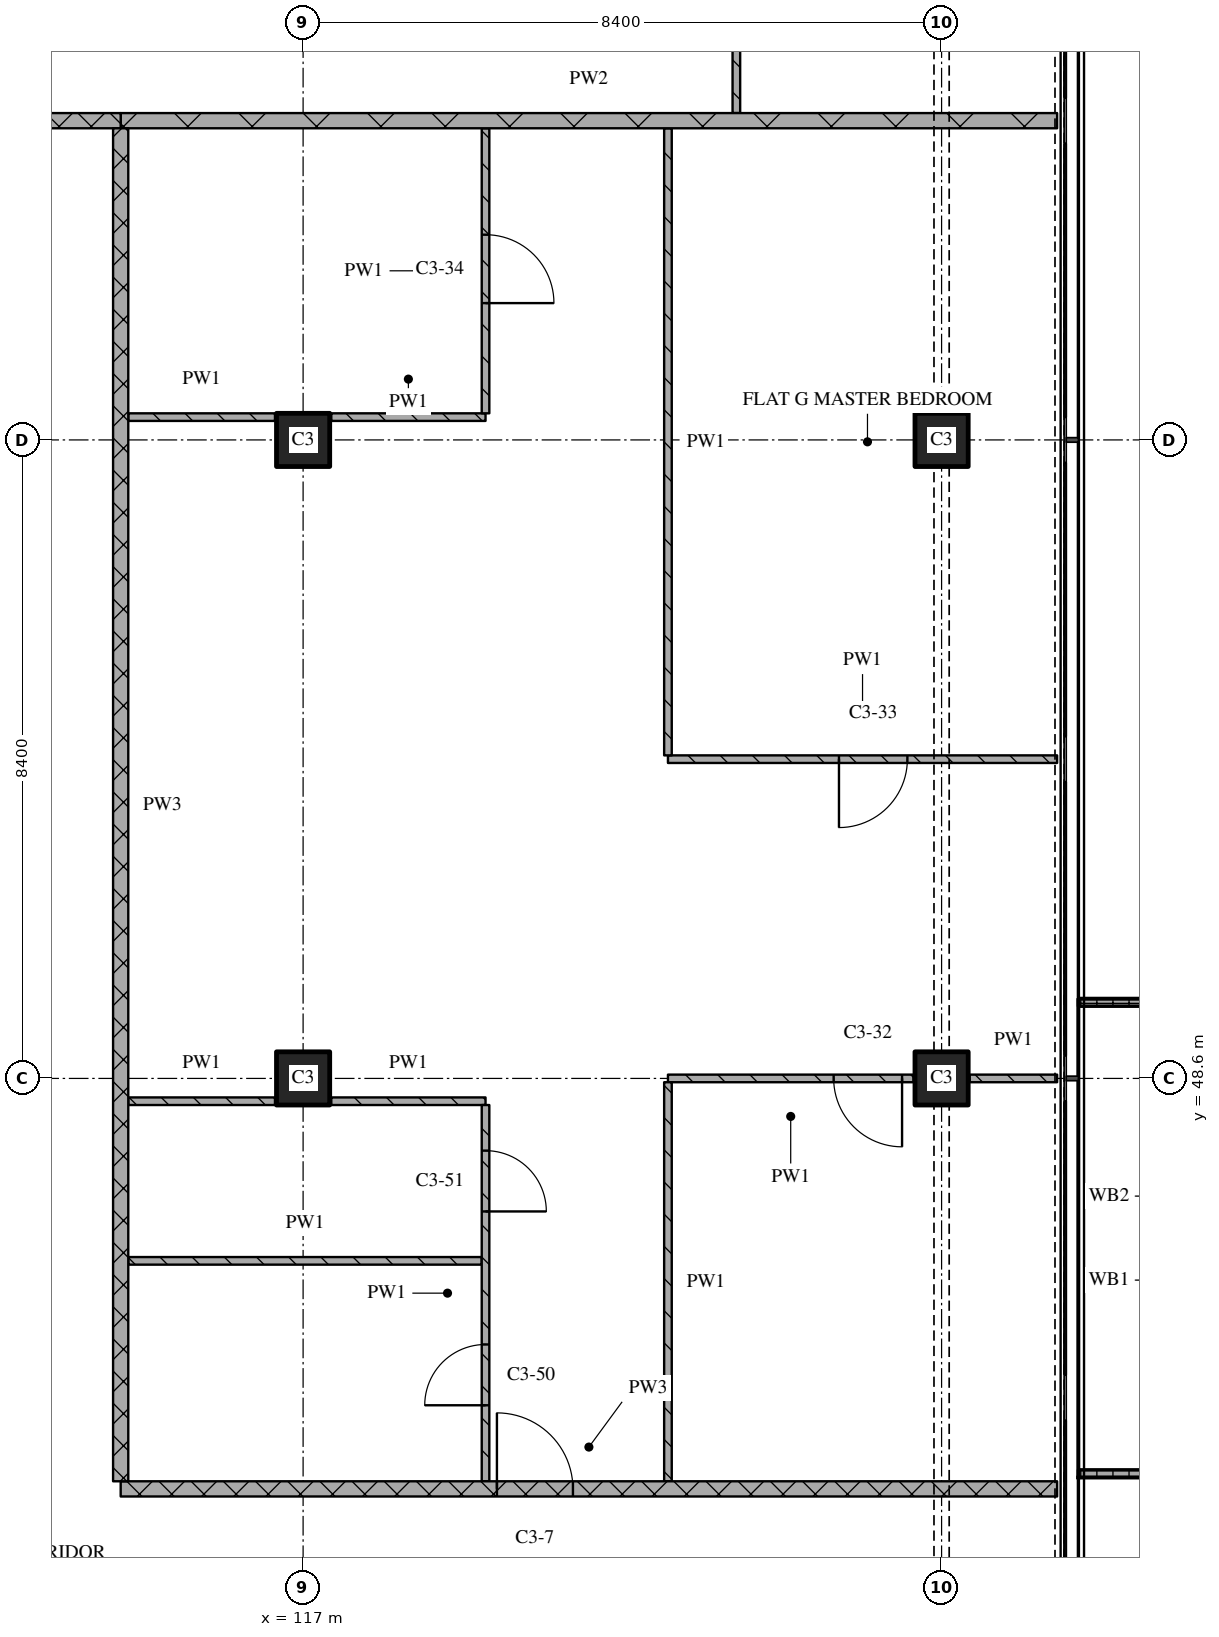
"""IFC4 building model, lengths in metres.
Left out: names, types, materials, properties, quantities, classifications, styles, units other than length and angle.
Written with IfcOpenShell. Run it as: python <this file> out.ifc"""

import sys

from ifc_helpers import new_model, si_unit, direction, frame, frame_2d, origin, origin_2d, place, context, subcontext, project, spatial, polyline, rectangle, outline, extrude, element, fill, save


model = new_model("IFC4")
c1 = context("Model", 3, precision=1e-05, world=origin(), true_north=direction((0.0, 1.0)))
c2 = subcontext(c1, "Body", "Model", "MODEL_VIEW")
j1 = project(units=[si_unit("LENGTHUNIT", "METRE"), si_unit("PLANEANGLEUNIT", "RADIAN")], contexts=[c1])
p1 = place(None, origin())
s1 = spatial("IfcSite", under=j1, at=p1, CompositionType="ELEMENT")
p2 = place(p1, origin())
s2 = spatial("IfcBuilding", under=s1, at=p2, CompositionType="ELEMENT")
p3 = place(p2, frame((0.0, 0.0, 172.65)))
s3 = spatial("IfcBuildingStorey", under=s2, at=p3, CompositionType="ELEMENT", Elevation=172.65)
for number, where, z_axis, x_axis in (
    (1, (117.0, 48.6, 0.0), (0.0, 0.0, 1.0), (1.0, 0.0, 0.0)),
    (2, (117.0, 57.0, 0.0), (0.0, 0.0, 1.0), (1.0, 0.0, 0.0)),
    (3, (125.4, 48.6, 0.0), (0.0, 0.0, 1.0), (1.0, 0.0, 0.0)),
    (4, (125.4, 57.0, 0.0), (0.0, 0.0, 1.0), (1.0, 0.0, 0.0)),
):
    element("IfcColumn", number, at=place(p3, frame(where, z_axis=z_axis, x_axis=x_axis)), inside=s3, PredefinedType="COLUMN", context=c2, shape_type="SweptSolid", body=[
        extrude(rectangle(XDim=0.7, YDim=0.7, at=origin_2d()), origin(), (0.0, 0.0, 1.0), 3.6),
    ])
p4 = place(p3, origin())
e5 = element("IfcWall", 5, at=p4, inside=s3, PredefinedType="SOLIDWALL", context=c2, shape_type="SweptSolid", body=[
    extrude(outline(polyline([(127.2, 43.35), (127.2, 43.45), (128.967, 43.45), (128.967, 49.55), (127.2, 49.55), (127.2, 49.65), (129.067, 49.65), (129.067, 43.35), (127.2, 43.35)])), origin(), (0.0, 0.0, 1.0), 1.0),
])
p5 = place(p3, frame((114.6, 43.2, 0.0), z_axis=(0.0, 0.0, 1.0), x_axis=(1.0, 0.0, 0.0)))
e6 = element("IfcWall", 6, at=p5, inside=s3, PredefinedType="PARTITIONING", context=c2, shape_type="SweptSolid", body=[
    extrude(rectangle(XDim=12.32, YDim=0.2, at=frame_2d((6.16, 0.0))), origin(), (0.0, 0.0, 1.0), 3.32),
])
p6 = place(p5, frame((4.95, 0.0, 0.0)))
e7 = element("IfcOpeningElement", 7, at=p6, cuts=e6, PredefinedType="OPENING", context=c2, shape_type="SweptSolid", body=[
    extrude(rectangle(XDim=1.0, YDim=2.1, at=frame_2d((0.5, 1.05))), frame((0.0, 0.11, 0.0), z_axis=(0.0, -1.0, 0.0), x_axis=(1.0, 0.0, 0.0)), (0.0, 0.0, 1.0), 0.22),
])
p7 = place(p3, frame((114.7, 46.2, 0.0), z_axis=(0.0, 0.0, 1.0), x_axis=(1.0, 0.0, 0.0)))
e8 = element("IfcWall", 8, at=p7, inside=s3, PredefinedType="PARTITIONING", context=c2, shape_type="SweptSolid", body=[
    extrude(rectangle(XDim=4.65, YDim=0.1, at=frame_2d((2.325, 0.0))), origin(), (0.0, 0.0, 1.0), 3.32),
])
p8 = place(p3, frame((114.7, 48.3, 0.0), z_axis=(0.0, 0.0, 1.0), x_axis=(1.0, 0.0, 0.0)))
e9 = element("IfcWall", 9, at=p8, inside=s3, PredefinedType="PARTITIONING", context=c2, shape_type="SweptSolid", body=[
    extrude(rectangle(XDim=1.93, YDim=0.1, at=frame_2d((0.965, 0.0))), origin(), (0.0, 0.0, 1.0), 3.32),
])
p9 = place(p3, frame((117.37, 48.3, 0.0), z_axis=(0.0, 0.0, 1.0), x_axis=(1.0, 0.0, 0.0)))
e10 = element("IfcWall", 10, at=p9, inside=s3, PredefinedType="PARTITIONING", context=c2, shape_type="SweptSolid", body=[
    extrude(rectangle(XDim=2.03, YDim=0.1, at=frame_2d((1.015, 0.0))), origin(), (0.0, 0.0, 1.0), 3.32),
])
p10 = place(p3, frame((125.03, 48.6, 0.0), z_axis=(0.0, 0.0, 1.0), x_axis=(-1.0, 0.0, 0.0)))
e11 = element("IfcWall", 11, at=p10, inside=s3, PredefinedType="PARTITIONING", context=c2, shape_type="SweptSolid", body=[
    extrude(rectangle(XDim=3.23, YDim=0.1, at=frame_2d((1.615, 0.0))), origin(), (0.0, 0.0, 1.0), 3.32),
])
p11 = place(p10, frame((0.15, 0.0, 0.0)))
e12 = element("IfcOpeningElement", 12, at=p11, cuts=e11, PredefinedType="OPENING", context=c2, shape_type="SweptSolid", body=[
    extrude(rectangle(XDim=0.9, YDim=2.1, at=frame_2d((0.45, 1.05))), frame((0.0, 0.06, 0.0), z_axis=(0.0, -1.0, 0.0), x_axis=(1.0, 0.0, 0.0)), (0.0, 0.0, 1.0), 0.12),
])
p12 = place(p3, frame((125.77, 48.6, 0.0), z_axis=(0.0, 0.0, 1.0), x_axis=(1.0, 0.0, 0.0)))
e13 = element("IfcWall", 13, at=p12, inside=s3, PredefinedType="PARTITIONING", context=c2, shape_type="SweptSolid", body=[
    extrude(rectangle(XDim=1.15, YDim=0.1, at=frame_2d((0.575, 0.0))), origin(), (0.0, 0.0, 1.0), 3.32),
])
p13 = place(p3, frame((121.8, 52.8, 0.0), z_axis=(0.0, 0.0, 1.0), x_axis=(1.0, 0.0, 0.0)))
e14 = element("IfcWall", 14, at=p13, inside=s3, PredefinedType="PARTITIONING", context=c2, shape_type="SweptSolid", body=[
    extrude(rectangle(XDim=5.12, YDim=0.1, at=frame_2d((2.56, 0.0))), origin(), (0.0, 0.0, 1.0), 3.32),
])
p14 = place(p13, frame((2.25, 0.0, 0.0)))
e15 = element("IfcOpeningElement", 15, at=p14, cuts=e14, PredefinedType="OPENING", context=c2, shape_type="SweptSolid", body=[
    extrude(rectangle(XDim=0.9, YDim=2.1, at=frame_2d((0.45, 1.05))), frame((0.0, 0.06, 0.0), z_axis=(0.0, -1.0, 0.0), x_axis=(1.0, 0.0, 0.0)), (0.0, 0.0, 1.0), 0.12),
])
p15 = place(p3, frame((114.7, 57.3, 0.0), z_axis=(0.0, 0.0, 1.0), x_axis=(1.0, 0.0, 0.0)))
e16 = element("IfcWall", 16, at=p15, inside=s3, PredefinedType="PARTITIONING", context=c2, shape_type="SweptSolid", body=[
    extrude(rectangle(XDim=1.93, YDim=0.1, at=frame_2d((0.965, 0.0))), origin(), (0.0, 0.0, 1.0), 3.32),
])
p16 = place(p3, frame((117.37, 57.3, 0.0), z_axis=(0.0, 0.0, 1.0), x_axis=(1.0, 0.0, 0.0)))
e17 = element("IfcWall", 17, at=p16, inside=s3, PredefinedType="PARTITIONING", context=c2, shape_type="SweptSolid", body=[
    extrude(rectangle(XDim=2.03, YDim=0.1, at=frame_2d((1.015, 0.0))), origin(), (0.0, 0.0, 1.0), 3.32),
])
p17 = place(p3, frame((111.0, 61.2, 0.0), z_axis=(0.0, 0.0, 1.0), x_axis=(1.0, 0.0, 0.0)))
e18 = element("IfcWall", 18, at=p17, inside=s3, PredefinedType="PARTITIONING", context=c2, shape_type="SweptSolid", body=[
    extrude(rectangle(XDim=3.6, YDim=0.2, at=frame_2d((1.8, 0.0))), origin(), (0.0, 0.0, 1.0), 3.32),
])
p18 = place(p3, frame((114.6, 61.2, 0.0), z_axis=(0.0, 0.0, 1.0), x_axis=(1.0, 0.0, 0.0)))
e19 = element("IfcWall", 19, at=p18, inside=s3, PredefinedType="PARTITIONING", context=c2, shape_type="SweptSolid", body=[
    extrude(rectangle(XDim=12.32, YDim=0.2, at=frame_2d((6.16, 0.0))), origin(), (0.0, 0.0, 1.0), 3.32),
])
p19 = place(p3, frame((114.6, 61.1, 0.0), z_axis=(0.0, 0.0, 1.0), x_axis=(0.0, -1.0, 0.0)))
e20 = element("IfcWall", 20, at=p19, inside=s3, PredefinedType="PARTITIONING", context=c2, shape_type="SweptSolid", body=[
    extrude(rectangle(XDim=17.8, YDim=0.2, at=frame_2d((8.9, 0.0))), origin(), (0.0, 0.0, 1.0), 3.32),
])
p20 = place(p3, frame((119.4, 43.3, 0.0), z_axis=(0.0, 0.0, 1.0), x_axis=(0.0, 1.0, 0.0)))
e21 = element("IfcWall", 21, at=p20, inside=s3, PredefinedType="PARTITIONING", context=c2, shape_type="SweptSolid", body=[
    extrude(rectangle(XDim=4.95, YDim=0.1, at=frame_2d((2.475, 0.0))), origin(), (0.0, 0.0, 1.0), 3.32),
])
p21 = place(p20, frame((1.0, 0.0, 0.0)))
e22 = element("IfcOpeningElement", 22, at=p21, cuts=e21, PredefinedType="OPENING", context=c2, shape_type="SweptSolid", body=[
    extrude(rectangle(XDim=0.8, YDim=2.1, at=frame_2d((0.4, 1.05))), frame((0.0, 0.06, 0.0), z_axis=(0.0, -1.0, 0.0), x_axis=(1.0, 0.0, 0.0)), (0.0, 0.0, 1.0), 0.12),
])
p22 = place(p20, frame((3.55, 0.0, 0.0)))
e23 = element("IfcOpeningElement", 23, at=p22, cuts=e21, PredefinedType="OPENING", context=c2, shape_type="SweptSolid", body=[
    extrude(rectangle(XDim=0.8, YDim=2.1, at=frame_2d((0.4, 1.05))), frame((0.0, 0.06, 0.0), z_axis=(0.0, -1.0, 0.0), x_axis=(1.0, 0.0, 0.0)), (0.0, 0.0, 1.0), 0.12),
])
p23 = place(p3, frame((119.4, 57.35, 0.0), z_axis=(0.0, 0.0, 1.0), x_axis=(0.0, 1.0, 0.0)))
e24 = element("IfcWall", 24, at=p23, inside=s3, PredefinedType="PARTITIONING", context=c2, shape_type="SweptSolid", body=[
    extrude(rectangle(XDim=3.75, YDim=0.1, at=frame_2d((1.875, 0.0))), origin(), (0.0, 0.0, 1.0), 3.32),
])
p24 = place(p23, frame((1.45, 0.0, 0.0)))
e25 = element("IfcOpeningElement", 25, at=p24, cuts=e24, PredefinedType="OPENING", context=c2, shape_type="SweptSolid", body=[
    extrude(rectangle(XDim=0.9, YDim=2.1, at=frame_2d((0.45, 1.05))), frame((0.0, 0.06, 0.0), z_axis=(0.0, -1.0, 0.0), x_axis=(1.0, 0.0, 0.0)), (0.0, 0.0, 1.0), 0.12),
])
p25 = place(p3, frame((121.8, 48.55, 0.0), z_axis=(0.0, 0.0, 1.0), x_axis=(0.0, -1.0, 0.0)))
e26 = element("IfcWall", 26, at=p25, inside=s3, PredefinedType="PARTITIONING", context=c2, shape_type="SweptSolid", body=[
    extrude(rectangle(XDim=5.25, YDim=0.1, at=frame_2d((2.625, 0.0))), origin(), (0.0, 0.0, 1.0), 3.32),
])
for number, where, z_axis, x_axis in (
    (27, (121.8, 61.1, 0.0), (0.0, 0.0, 1.0), (0.0, -1.0, 0.0)),
    (28, (122.7, 69.55, 0.0), (0.0, 0.0, 1.0), (0.0, -1.0, 0.0)),
):
    element("IfcWall", number, at=place(p3, frame(where, z_axis=z_axis, x_axis=x_axis)), inside=s3, PredefinedType="PARTITIONING", context=c2, shape_type="SweptSolid", body=[
        extrude(rectangle(XDim=8.25, YDim=0.1, at=frame_2d((4.125, 0.0))), origin(), (0.0, 0.0, 1.0), 3.32),
    ])
p26 = place(p6, origin())
e29 = element("IfcDoor", 29, at=p26, inside=s3, OperationType="SINGLE_SWING_LEFT", PredefinedType="DOOR", context=c2, shape_type="SweptSolid", body=[
    extrude(rectangle(XDim=1.0, YDim=2.1, at=frame_2d((0.5, 1.05))), frame((0.0, 0.025, 0.0), z_axis=(0.0, -1.0, 0.0), x_axis=(1.0, 0.0, 0.0)), (0.0, 0.0, 1.0), 0.05),
])
fill(e7, e29)
p27 = place(p11, origin())
e30 = element("IfcDoor", 30, at=p27, inside=s3, OperationType="SINGLE_SWING_LEFT", PredefinedType="DOOR", context=c2, shape_type="SweptSolid", body=[
    extrude(rectangle(XDim=0.9, YDim=2.1, at=frame_2d((0.45, 1.05))), frame((0.0, 0.025, 0.0), z_axis=(0.0, -1.0, 0.0), x_axis=(1.0, 0.0, 0.0)), (0.0, 0.0, 1.0), 0.05),
])
fill(e12, e30)
p28 = place(p14, origin())
e31 = element("IfcDoor", 31, at=p28, inside=s3, OperationType="SINGLE_SWING_RIGHT", PredefinedType="DOOR", context=c2, shape_type="SweptSolid", body=[
    extrude(rectangle(XDim=0.9, YDim=2.1, at=frame_2d((0.45, 1.05))), frame((0.0, 0.025, 0.0), z_axis=(0.0, -1.0, 0.0), x_axis=(1.0, 0.0, 0.0)), (0.0, 0.0, 1.0), 0.05),
])
fill(e15, e31)
p29 = place(p21, origin())
e32 = element("IfcDoor", 32, at=p29, inside=s3, OperationType="SINGLE_SWING_LEFT", PredefinedType="DOOR", context=c2, shape_type="SweptSolid", body=[
    extrude(rectangle(XDim=0.8, YDim=2.1, at=frame_2d((0.4, 1.05))), frame((0.0, 0.025, 0.0), z_axis=(0.0, -1.0, 0.0), x_axis=(1.0, 0.0, 0.0)), (0.0, 0.0, 1.0), 0.05),
])
fill(e22, e32)
p30 = place(p22, origin())
e33 = element("IfcDoor", 33, at=p30, inside=s3, OperationType="SINGLE_SWING_RIGHT", PredefinedType="DOOR", context=c2, shape_type="SweptSolid", body=[
    extrude(rectangle(XDim=0.8, YDim=2.1, at=frame_2d((0.4, 1.05))), frame((0.0, 0.025, 0.0), z_axis=(0.0, -1.0, 0.0), x_axis=(1.0, 0.0, 0.0)), (0.0, 0.0, 1.0), 0.05),
])
fill(e23, e33)
p31 = place(p24, origin())
e34 = element("IfcDoor", 34, at=p31, inside=s3, OperationType="SINGLE_SWING_RIGHT", PredefinedType="DOOR", context=c2, shape_type="SweptSolid", body=[
    extrude(rectangle(XDim=0.9, YDim=2.1, at=frame_2d((0.45, 1.05))), frame((0.0, 0.025, 0.0), z_axis=(0.0, -1.0, 0.0), x_axis=(1.0, 0.0, 0.0)), (0.0, 0.0, 1.0), 0.05),
])
fill(e25, e34)
save(model, sys.argv[1])
